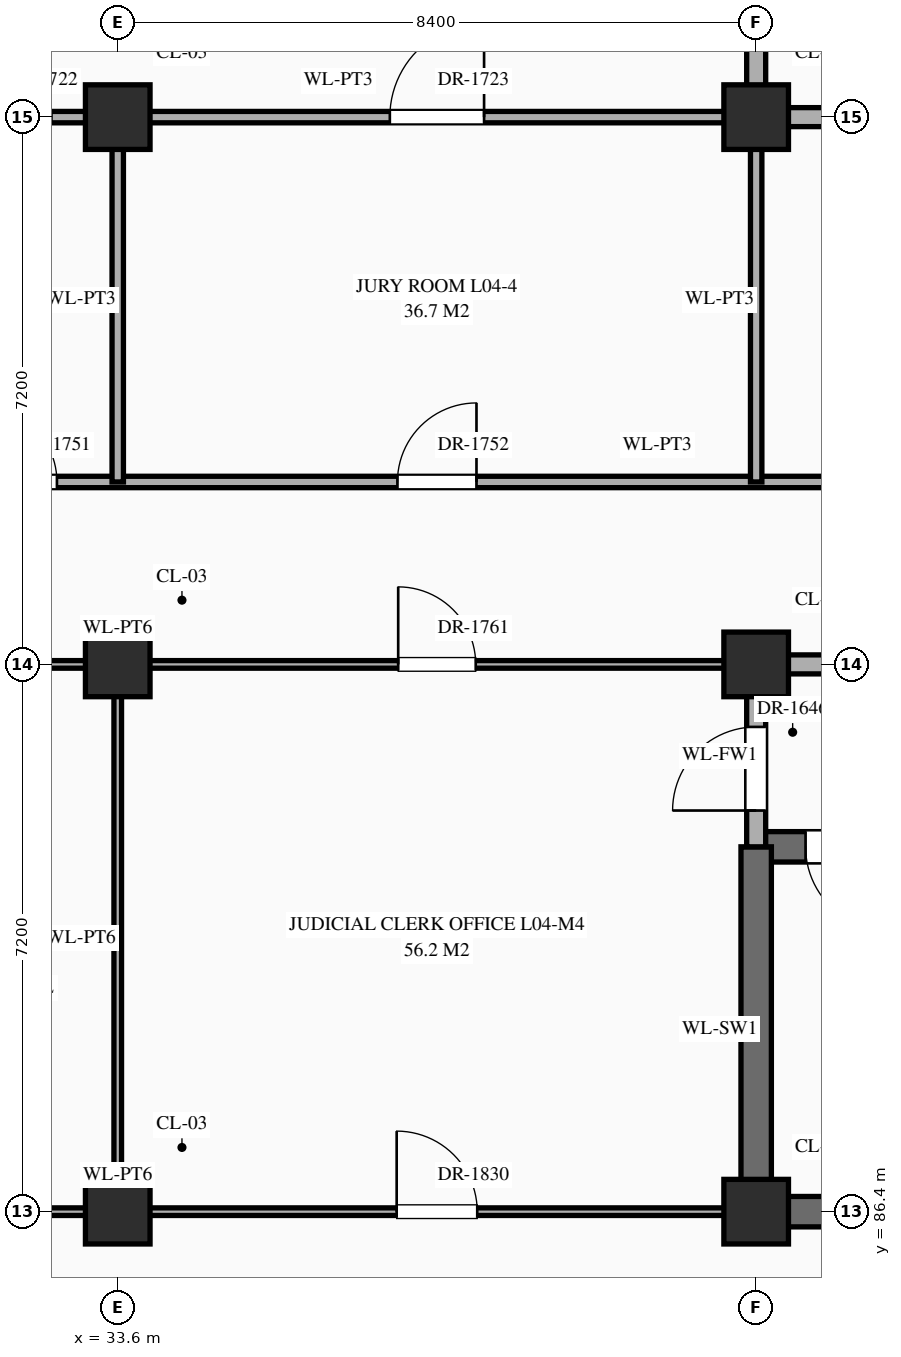
"""IFC4 building model, lengths in metres.
Left out: names, types, materials, properties, quantities, classifications, styles, units other than length and angle.
Written with IfcOpenShell. Run it as: python <this file> out.ifc"""

import sys

from ifc_helpers import new_model, si_unit, direction, frame, frame_2d, origin, origin_2d, place, context, subcontext, project, spatial, rectangle, extrude, element, fill, save


model = new_model("IFC4")
c1 = context("Model", 3, precision=1e-05, world=origin(), true_north=direction((0.0, 1.0)))
c2 = subcontext(c1, "Body", "Model", "MODEL_VIEW")
j1 = project(units=[si_unit("LENGTHUNIT", "METRE"), si_unit("PLANEANGLEUNIT", "RADIAN")], contexts=[c1])
p1 = place(None, origin())
s1 = spatial("IfcSite", under=j1, at=p1, CompositionType="ELEMENT")
p2 = place(p1, origin())
s2 = spatial("IfcBuilding", under=s1, at=p2, CompositionType="ELEMENT")
p3 = place(p2, frame((0.0, 0.0, 16.2)))
s3 = spatial("IfcBuildingStorey", under=s2, at=p3, CompositionType="ELEMENT", Elevation=16.2)
for number, where, z_axis, x_axis in (
    (1, (33.6, 86.4, 0.0), (0.0, 0.0, 1.0), (1.0, 0.0, 0.0)),
    (2, (33.6, 93.6, 0.0), (0.0, 0.0, 1.0), (1.0, 0.0, 0.0)),
    (3, (33.6, 100.8, 0.0), (0.0, 0.0, 1.0), (1.0, 0.0, 0.0)),
    (4, (42.0, 86.4, 0.0), (0.0, 0.0, 1.0), (1.0, 0.0, 0.0)),
    (5, (42.0, 93.6, 0.0), (0.0, 0.0, 1.0), (1.0, 0.0, 0.0)),
    (6, (42.0, 100.8, 0.0), (0.0, 0.0, 1.0), (1.0, 0.0, 0.0)),
):
    element("IfcColumn", number, at=place(p3, frame(where, z_axis=z_axis, x_axis=x_axis)), inside=s3, PredefinedType="COLUMN", context=c2, shape_type="SweptSolid", body=[
        extrude(rectangle(XDim=0.85, YDim=0.85, at=origin_2d()), origin(), (0.0, 0.0, 1.0), 5.4),
    ])
p4 = place(p3, frame((25.2, 86.4, 0.0), z_axis=(0.0, 0.0, 1.0), x_axis=(1.0, 0.0, 0.0)))
e7 = element("IfcWall", 7, at=p4, inside=s3, PredefinedType="STANDARD", context=c2, shape_type="SweptSolid", body=[
    extrude(rectangle(XDim=16.8, YDim=0.1, at=frame_2d((8.4, 0.0))), origin(), (0.0, 0.0, 1.0), 4.27),
])
p5 = place(p4, frame((0.933, 0.0, 0.0)))
e8 = element("IfcOpeningElement", 8, at=p5, cuts=e7, PredefinedType="OPENING", context=c2, shape_type="SweptSolid", body=[
    extrude(rectangle(XDim=1.28, YDim=2.35, at=frame_2d((0.64, 1.175))), frame((0.0, 0.062, 0.0), z_axis=(0.0, -1.0, 0.0), x_axis=(1.0, 0.0, 0.0)), (0.0, 0.0, 1.0), 0.124),
])
p6 = place(p4, frame((3.425, 0.0, 0.0)))
e9 = element("IfcOpeningElement", 9, at=p6, cuts=e7, PredefinedType="OPENING", context=c2, shape_type="SweptSolid", body=[
    extrude(rectangle(XDim=1.55, YDim=2.35, at=frame_2d((0.775, 1.175))), frame((0.0, 0.062, 0.0), z_axis=(0.0, -1.0, 0.0), x_axis=(1.0, 0.0, 0.0)), (0.0, 0.0, 1.0), 0.124),
])
p7 = place(p4, frame((6.317, 0.0, 0.0)))
e10 = element("IfcOpeningElement", 10, at=p7, cuts=e7, PredefinedType="OPENING", context=c2, shape_type="SweptSolid", body=[
    extrude(rectangle(XDim=1.02, YDim=2.4, at=frame_2d((0.51, 1.2))), frame((0.0, 0.062, 0.0), z_axis=(0.0, -1.0, 0.0), x_axis=(1.0, 0.0, 0.0)), (0.0, 0.0, 1.0), 0.124),
])
p8 = place(p4, frame((12.07, 0.0, 0.0)))
e11 = element("IfcOpeningElement", 11, at=p8, cuts=e7, PredefinedType="OPENING", context=c2, shape_type="SweptSolid", body=[
    extrude(rectangle(XDim=1.06, YDim=2.4, at=frame_2d((0.53, 1.2))), frame((0.0, 0.062, 0.0), z_axis=(0.0, -1.0, 0.0), x_axis=(1.0, 0.0, 0.0)), (0.0, 0.0, 1.0), 0.124),
])
p9 = place(p3, frame((42.0, 86.4, 0.0), z_axis=(0.0, 0.0, 1.0), x_axis=(1.0, 0.0, 0.0)))
e12 = element("IfcWall", 12, at=p9, inside=s3, PredefinedType="SHEAR", context=c2, shape_type="SweptSolid", body=[
    extrude(rectangle(XDim=8.4, YDim=0.4, at=frame_2d((4.2, 0.0))), origin(), (0.0, 0.0, 1.0), 5.12),
])
p10 = place(p3, frame((42.0, 91.2, 0.0), z_axis=(0.0, 0.0, 1.0), x_axis=(1.0, 0.0, 0.0)))
e13 = element("IfcWall", 13, at=p10, inside=s3, PredefinedType="SHEAR", context=c2, shape_type="SweptSolid", body=[
    extrude(rectangle(XDim=8.4, YDim=0.4, at=frame_2d((4.2, 0.0))), origin(), (0.0, 0.0, 1.0), 5.12),
])
p11 = place(p10, frame((0.65, 0.0, 0.0)))
e14 = element("IfcOpeningElement", 14, at=p11, cuts=e13, PredefinedType="OPENING", context=c2, shape_type="SweptSolid", body=[
    extrude(rectangle(XDim=1.1, YDim=2.2, at=frame_2d((0.55, 1.1))), frame((0.0, 0.212, 0.0), z_axis=(0.0, -1.0, 0.0), x_axis=(1.0, 0.0, 0.0)), (0.0, 0.0, 1.0), 0.424),
])
p12 = place(p3, frame((25.2, 93.6, 0.0), z_axis=(0.0, 0.0, 1.0), x_axis=(1.0, 0.0, 0.0)))
e15 = element("IfcWall", 15, at=p12, inside=s3, PredefinedType="STANDARD", context=c2, shape_type="SweptSolid", body=[
    extrude(rectangle(XDim=16.8, YDim=0.1, at=frame_2d((8.4, 0.0))), origin(), (0.0, 0.0, 1.0), 4.27),
])
p13 = place(p12, frame((0.933, 0.0, 0.0)))
e16 = element("IfcOpeningElement", 16, at=p13, cuts=e15, PredefinedType="OPENING", context=c2, shape_type="SweptSolid", body=[
    extrude(rectangle(XDim=1.28, YDim=2.35, at=frame_2d((0.64, 1.175))), frame((0.0, 0.062, 0.0), z_axis=(0.0, -1.0, 0.0), x_axis=(1.0, 0.0, 0.0)), (0.0, 0.0, 1.0), 0.124),
])
p14 = place(p12, frame((3.25, 0.0, 0.0)))
e17 = element("IfcOpeningElement", 17, at=p14, cuts=e15, PredefinedType="OPENING", context=c2, shape_type="SweptSolid", body=[
    extrude(rectangle(XDim=1.9, YDim=2.5, at=frame_2d((0.95, 1.25))), frame((0.0, 0.062, 0.0), z_axis=(0.0, -1.0, 0.0), x_axis=(1.0, 0.0, 0.0)), (0.0, 0.0, 1.0), 0.124),
])
p15 = place(p12, frame((6.337, 0.0, 0.0)))
e18 = element("IfcOpeningElement", 18, at=p15, cuts=e15, PredefinedType="OPENING", context=c2, shape_type="SweptSolid", body=[
    extrude(rectangle(XDim=0.98, YDim=2.35, at=frame_2d((0.49, 1.175))), frame((0.0, 0.062, 0.0), z_axis=(0.0, -1.0, 0.0), x_axis=(1.0, 0.0, 0.0)), (0.0, 0.0, 1.0), 0.124),
])
p16 = place(p12, frame((12.09, 0.0, 0.0)))
e19 = element("IfcOpeningElement", 19, at=p16, cuts=e15, PredefinedType="OPENING", context=c2, shape_type="SweptSolid", body=[
    extrude(rectangle(XDim=1.02, YDim=2.4, at=frame_2d((0.51, 1.2))), frame((0.0, 0.062, 0.0), z_axis=(0.0, -1.0, 0.0), x_axis=(1.0, 0.0, 0.0)), (0.0, 0.0, 1.0), 0.124),
])
p17 = place(p3, frame((42.0, 93.6, 0.0), z_axis=(0.0, 0.0, 1.0), x_axis=(1.0, 0.0, 0.0)))
e20 = element("IfcWall", 20, at=p17, inside=s3, PredefinedType="STANDARD", context=c2, shape_type="SweptSolid", body=[
    extrude(rectangle(XDim=8.4, YDim=0.25, at=frame_2d((4.2, 0.0))), origin(), (0.0, 0.0, 1.0), 4.27),
])
p18 = place(p17, frame((3.288, 0.0, 0.0)))
e21 = element("IfcOpeningElement", 21, at=p18, cuts=e20, PredefinedType="OPENING", context=c2, shape_type="SweptSolid", body=[
    extrude(rectangle(XDim=1.8, YDim=2.35, at=frame_2d((0.9, 1.175))), frame((0.0, 0.137, 0.0), z_axis=(0.0, -1.0, 0.0), x_axis=(1.0, 0.0, 0.0)), (0.0, 0.0, 1.0), 0.274),
])
p19 = place(p3, frame((31.0, 96.0, 0.0), z_axis=(0.0, 0.0, 1.0), x_axis=(1.0, 0.0, 0.0)))
e22 = element("IfcWall", 22, at=p19, inside=s3, PredefinedType="STANDARD", context=c2, shape_type="SweptSolid", body=[
    extrude(rectangle(XDim=19.4, YDim=0.15, at=frame_2d((9.7, 0.0))), origin(), (0.0, 0.0, 1.0), 5.12),
])
p20 = place(p19, frame((0.8, 0.0, 0.0)))
e23 = element("IfcOpeningElement", 23, at=p20, cuts=e22, PredefinedType="OPENING", context=c2, shape_type="SweptSolid", body=[
    extrude(rectangle(XDim=1.0, YDim=2.25, at=frame_2d((0.5, 1.125))), frame((0.0, 0.087, 0.0), z_axis=(0.0, -1.0, 0.0), x_axis=(1.0, 0.0, 0.0)), (0.0, 0.0, 1.0), 0.174),
])
p21 = place(p19, frame((6.28, 0.0, 0.0)))
e24 = element("IfcOpeningElement", 24, at=p21, cuts=e22, PredefinedType="OPENING", context=c2, shape_type="SweptSolid", body=[
    extrude(rectangle(XDim=1.04, YDim=2.2, at=frame_2d((0.52, 1.1))), frame((0.0, 0.087, 0.0), z_axis=(0.0, -1.0, 0.0), x_axis=(1.0, 0.0, 0.0)), (0.0, 0.0, 1.0), 0.174),
])
p22 = place(p19, frame((14.66, 0.0, 0.0)))
e25 = element("IfcOpeningElement", 25, at=p22, cuts=e22, PredefinedType="OPENING", context=c2, shape_type="SweptSolid", body=[
    extrude(rectangle(XDim=1.08, YDim=2.25, at=frame_2d((0.54, 1.125))), frame((0.0, 0.087, 0.0), z_axis=(0.0, -1.0, 0.0), x_axis=(1.0, 0.0, 0.0)), (0.0, 0.0, 1.0), 0.174),
])
p23 = place(p3, frame((31.0, 100.8, 0.0), z_axis=(0.0, 0.0, 1.0), x_axis=(1.0, 0.0, 0.0)))
e26 = element("IfcWall", 26, at=p23, inside=s3, PredefinedType="STANDARD", context=c2, shape_type="SweptSolid", body=[
    extrude(rectangle(XDim=11.0, YDim=0.15, at=frame_2d((5.5, 0.0))), origin(), (0.0, 0.0, 1.0), 4.27),
])
p24 = place(p23, frame((0.528, 0.0, 0.0)))
e27 = element("IfcOpeningElement", 27, at=p24, cuts=e26, PredefinedType="OPENING", context=c2, shape_type="SweptSolid", body=[
    extrude(rectangle(XDim=1.2, YDim=2.35, at=frame_2d((0.6, 1.175))), frame((0.0, 0.087, 0.0), z_axis=(0.0, -1.0, 0.0), x_axis=(1.0, 0.0, 0.0)), (0.0, 0.0, 1.0), 0.174),
])
p25 = place(p23, frame((6.18, 0.0, 0.0)))
e28 = element("IfcOpeningElement", 28, at=p25, cuts=e26, PredefinedType="OPENING", context=c2, shape_type="SweptSolid", body=[
    extrude(rectangle(XDim=1.24, YDim=2.3, at=frame_2d((0.62, 1.15))), frame((0.0, 0.087, 0.0), z_axis=(0.0, -1.0, 0.0), x_axis=(1.0, 0.0, 0.0)), (0.0, 0.0, 1.0), 0.174),
])
p26 = place(p3, frame((42.0, 100.8, 0.0), z_axis=(0.0, 0.0, 1.0), x_axis=(1.0, 0.0, 0.0)))
e29 = element("IfcWall", 29, at=p26, inside=s3, PredefinedType="STANDARD", context=c2, shape_type="SweptSolid", body=[
    extrude(rectangle(XDim=4.2, YDim=0.25, at=frame_2d((2.1, 0.0))), origin(), (0.0, 0.0, 1.0), 4.27),
])
p27 = place(p3, frame((33.6, 86.4, 0.0), z_axis=(0.0, 0.0, 1.0), x_axis=(0.0, 1.0, 0.0)))
e30 = element("IfcWall", 30, at=p27, inside=s3, PredefinedType="STANDARD", context=c2, shape_type="SweptSolid", body=[
    extrude(rectangle(XDim=7.2, YDim=0.1, at=frame_2d((3.6, 0.0))), origin(), (0.0, 0.0, 1.0), 4.37),
])
p28 = place(p3, frame((33.6, 96.0, 0.0), z_axis=(0.0, 0.0, 1.0), x_axis=(0.0, 1.0, 0.0)))
e31 = element("IfcWall", 31, at=p28, inside=s3, PredefinedType="STANDARD", context=c2, shape_type="SweptSolid", body=[
    extrude(rectangle(XDim=4.8, YDim=0.15, at=frame_2d((2.4, 0.0))), origin(), (0.0, 0.0, 1.0), 4.37),
])
p29 = place(p3, frame((42.0, 86.4, 0.0), z_axis=(0.0, 0.0, 1.0), x_axis=(0.0, 1.0, 0.0)))
e32 = element("IfcWall", 32, at=p29, inside=s3, PredefinedType="SHEAR", context=c2, shape_type="SweptSolid", body=[
    extrude(rectangle(XDim=4.8, YDim=0.4, at=frame_2d((2.4, 0.0))), origin(), (0.0, 0.0, 1.0), 5.12),
])
p30 = place(p3, frame((42.0, 91.2, 0.0), z_axis=(0.0, 0.0, 1.0), x_axis=(0.0, 1.0, 0.0)))
e33 = element("IfcWall", 33, at=p30, inside=s3, PredefinedType="STANDARD", context=c2, shape_type="SweptSolid", body=[
    extrude(rectangle(XDim=2.4, YDim=0.25, at=frame_2d((1.2, 0.0))), origin(), (0.0, 0.0, 1.0), 4.37),
])
p31 = place(p30, frame((0.478, 0.0, 0.0)))
e34 = element("IfcOpeningElement", 34, at=p31, cuts=e33, PredefinedType="OPENING", context=c2, shape_type="SweptSolid", body=[
    extrude(rectangle(XDim=1.1, YDim=2.2, at=frame_2d((0.55, 1.1))), frame((0.0, 0.137, 0.0), z_axis=(0.0, -1.0, 0.0), x_axis=(1.0, 0.0, 0.0)), (0.0, 0.0, 1.0), 0.274),
])
p32 = place(p3, frame((42.0, 96.0, 0.0), z_axis=(0.0, 0.0, 1.0), x_axis=(0.0, 1.0, 0.0)))
e35 = element("IfcWall", 35, at=p32, inside=s3, PredefinedType="STANDARD", context=c2, shape_type="SweptSolid", body=[
    extrude(rectangle(XDim=4.8, YDim=0.15, at=frame_2d((2.4, 0.0))), origin(), (0.0, 0.0, 1.0), 4.37),
])
p33 = place(p3, frame((42.0, 100.8, 0.0), z_axis=(0.0, 0.0, 1.0), x_axis=(0.0, 1.0, 0.0)))
e36 = element("IfcWall", 36, at=p33, inside=s3, PredefinedType="STANDARD", context=c2, shape_type="SweptSolid", body=[
    extrude(rectangle(XDim=3.6, YDim=0.25, at=frame_2d((1.8, 0.0))), origin(), (0.0, 0.0, 1.0), 4.37),
])
p34 = place(p33, frame((0.897, 0.0, 0.0)))
e37 = element("IfcOpeningElement", 37, at=p34, cuts=e36, PredefinedType="OPENING", context=c2, shape_type="SweptSolid", body=[
    extrude(rectangle(XDim=0.95, YDim=2.15, at=frame_2d((0.475, 1.075))), frame((0.0, 0.137, 0.0), z_axis=(0.0, -1.0, 0.0), x_axis=(1.0, 0.0, 0.0)), (0.0, 0.0, 1.0), 0.274),
])
p35 = place(p11, frame((1.1, 0.0, 0.0), z_axis=(0.0, 0.0, 1.0), x_axis=(-1.0, 0.0, 0.0)))
e38 = element("IfcDoor", 38, at=p35, inside=s3, OperationType="SINGLE_SWING_LEFT", PredefinedType="DOOR", context=c2, shape_type="SweptSolid", body=[
    extrude(rectangle(XDim=1.1, YDim=2.2, at=frame_2d((0.55, 1.1))), frame((0.0, 0.025, 0.0), z_axis=(0.0, -1.0, 0.0), x_axis=(1.0, 0.0, 0.0)), (0.0, 0.0, 1.0), 0.05),
])
fill(e14, e38)
p36 = place(p31, origin())
e39 = element("IfcDoor", 39, at=p36, inside=s3, OperationType="SINGLE_SWING_LEFT", PredefinedType="DOOR", context=c2, shape_type="SweptSolid", body=[
    extrude(rectangle(XDim=1.1, YDim=2.2, at=frame_2d((0.55, 1.1))), frame((0.0, 0.025, 0.0), z_axis=(0.0, -1.0, 0.0), x_axis=(1.0, 0.0, 0.0)), (0.0, 0.0, 1.0), 0.05),
])
fill(e34, e39)
p37 = place(p25, origin())
e40 = element("IfcDoor", 40, at=p37, inside=s3, OperationType="SINGLE_SWING_RIGHT", PredefinedType="DOOR", context=c2, shape_type="SweptSolid", body=[
    extrude(rectangle(XDim=1.24, YDim=2.3, at=frame_2d((0.62, 1.15))), frame((0.0, 0.025, 0.0), z_axis=(0.0, -1.0, 0.0), x_axis=(1.0, 0.0, 0.0)), (0.0, 0.0, 1.0), 0.05),
])
fill(e28, e40)
p38 = place(p20, origin())
e41 = element("IfcDoor", 41, at=p38, inside=s3, OperationType="SINGLE_SWING_LEFT", PredefinedType="DOOR", context=c2, shape_type="SweptSolid", body=[
    extrude(rectangle(XDim=1.0, YDim=2.25, at=frame_2d((0.5, 1.125))), frame((0.0, 0.025, 0.0), z_axis=(0.0, -1.0, 0.0), x_axis=(1.0, 0.0, 0.0)), (0.0, 0.0, 1.0), 0.05),
])
fill(e23, e41)
p39 = place(p21, origin())
e42 = element("IfcDoor", 42, at=p39, inside=s3, OperationType="SINGLE_SWING_RIGHT", PredefinedType="DOOR", context=c2, shape_type="SweptSolid", body=[
    extrude(rectangle(XDim=1.04, YDim=2.2, at=frame_2d((0.52, 1.1))), frame((0.0, 0.025, 0.0), z_axis=(0.0, -1.0, 0.0), x_axis=(1.0, 0.0, 0.0)), (0.0, 0.0, 1.0), 0.05),
])
fill(e24, e42)
p40 = place(p16, origin())
e43 = element("IfcDoor", 43, at=p40, inside=s3, OperationType="SINGLE_SWING_LEFT", PredefinedType="DOOR", context=c2, shape_type="SweptSolid", body=[
    extrude(rectangle(XDim=1.02, YDim=2.4, at=frame_2d((0.51, 1.2))), frame((0.0, 0.025, 0.0), z_axis=(0.0, -1.0, 0.0), x_axis=(1.0, 0.0, 0.0)), (0.0, 0.0, 1.0), 0.05),
])
fill(e19, e43)
p41 = place(p8, origin())
e44 = element("IfcDoor", 44, at=p41, inside=s3, OperationType="SINGLE_SWING_LEFT", PredefinedType="DOOR", context=c2, shape_type="SweptSolid", body=[
    extrude(rectangle(XDim=1.06, YDim=2.4, at=frame_2d((0.53, 1.2))), frame((0.0, 0.025, 0.0), z_axis=(0.0, -1.0, 0.0), x_axis=(1.0, 0.0, 0.0)), (0.0, 0.0, 1.0), 0.05),
])
fill(e11, e44)
save(model, sys.argv[1])
